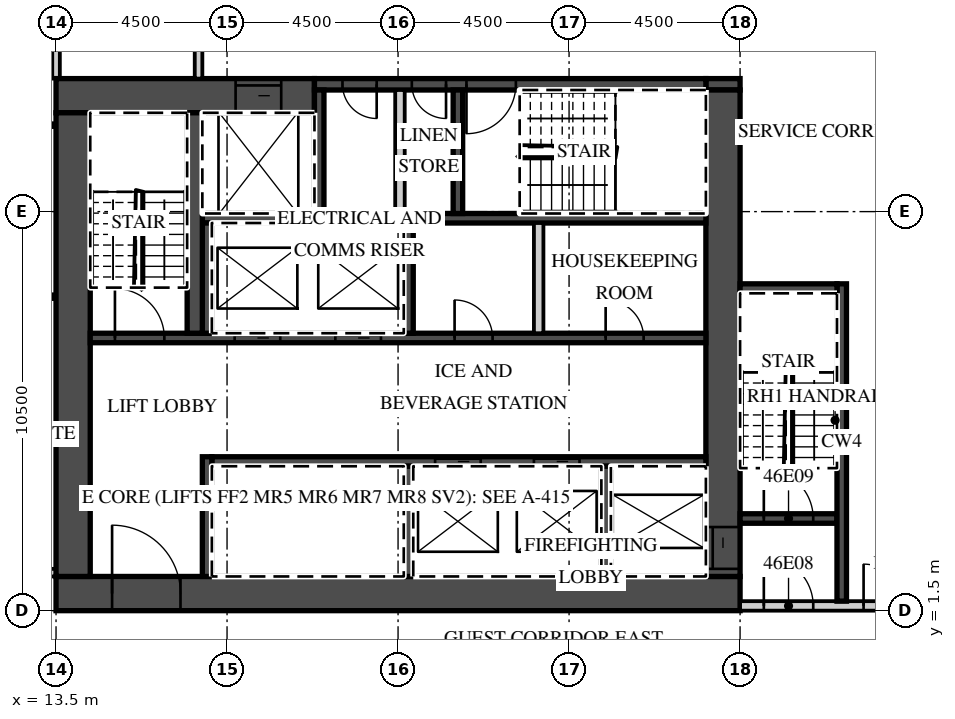
"""IFC4 building model, lengths in metres.
Left out: names, types, materials, properties, quantities, classifications, styles, units other than length and angle.
Written with IfcOpenShell. Run it as: python <this file> out.ifc"""

import sys

from ifc_helpers import new_model, si_unit, direction, frame, frame_2d, origin, place, context, subcontext, project, spatial, rectangle, extrude, element, fill, save


model = new_model("IFC4")
c1 = context("Model", 3, precision=1e-05, world=origin(), true_north=direction((0.0, 1.0)))
c2 = subcontext(c1, "Body", "Model", "MODEL_VIEW")
j1 = project(units=[si_unit("LENGTHUNIT", "METRE"), si_unit("PLANEANGLEUNIT", "RADIAN")], contexts=[c1])
p1 = place(None, origin())
s1 = spatial("IfcSite", under=j1, at=p1, CompositionType="ELEMENT")
p2 = place(p1, origin())
s2 = spatial("IfcBuilding", under=s1, at=p2, CompositionType="ELEMENT")
p3 = place(p2, frame((0.0, 0.0, 193.3)))
s3 = spatial("IfcBuildingStorey", under=s2, at=p3, CompositionType="ELEMENT", Elevation=193.3)
p4 = place(p3, frame((13.5, 15.5, 0.0), z_axis=(0.0, 0.0, 1.0), x_axis=(0.0, 1.0, 0.0)))
e1 = element("IfcWall", 1, at=p4, inside=s3, PredefinedType="PARTITIONING", context=c2, shape_type="SweptSolid", body=[
    extrude(rectangle(XDim=6.089, YDim=0.2, at=frame_2d((3.044, 0.0))), origin(), (0.0, 0.0, 1.0), 3.02),
])
p5 = place(p3, frame((-13.5, 2.5, 0.0), z_axis=(0.0, 0.0, 1.0), x_axis=(1.0, 0.0, 0.0)))
e2 = element("IfcWall", 2, at=p5, inside=s3, PredefinedType="PARTITIONING", context=c2, shape_type="SweptSolid", body=[
    extrude(rectangle(XDim=27.0, YDim=0.2, at=frame_2d((13.5, 0.0))), origin(), (0.0, 0.0, 1.0), 3.02),
])
p6 = place(p5, frame((0.575, 0.0, 0.0)))
e3 = element("IfcOpeningElement", 3, at=p6, cuts=e2, PredefinedType="OPENING", context=c2, shape_type="SweptSolid", body=[
    extrude(rectangle(XDim=1.0, YDim=2.1, at=frame_2d((0.5, 1.05))), frame((0.0, 0.11, 0.0), z_axis=(0.0, -1.0, 0.0), x_axis=(1.0, 0.0, 0.0)), (0.0, 0.0, 1.0), 0.22),
])
p7 = place(p5, frame((9.863, 0.0, 0.0)))
e4 = element("IfcOpeningElement", 4, at=p7, cuts=e2, PredefinedType="OPENING", context=c2, shape_type="SweptSolid", body=[
    extrude(rectangle(XDim=1.2, YDim=2.1, at=frame_2d((0.6, 1.05))), frame((0.0, 0.11, 0.0), z_axis=(0.0, -1.0, 0.0), x_axis=(1.0, 0.0, 0.0)), (0.0, 0.0, 1.0), 0.22),
])
p8 = place(p5, frame((14.075, 0.0, 0.0)))
e5 = element("IfcOpeningElement", 5, at=p8, cuts=e2, PredefinedType="OPENING", context=c2, shape_type="SweptSolid", body=[
    extrude(rectangle(XDim=1.0, YDim=2.1, at=frame_2d((0.5, 1.05))), frame((0.0, 0.11, 0.0), z_axis=(0.0, -1.0, 0.0), x_axis=(1.0, 0.0, 0.0)), (0.0, 0.0, 1.0), 0.22),
])
p9 = place(p5, frame((18.55, 0.0, 0.0)))
e6 = element("IfcOpeningElement", 6, at=p9, cuts=e2, PredefinedType="OPENING", context=c2, shape_type="SweptSolid", body=[
    extrude(rectangle(XDim=1.0, YDim=2.1, at=frame_2d((0.5, 1.05))), frame((0.0, 0.11, 0.0), z_axis=(0.0, -1.0, 0.0), x_axis=(1.0, 0.0, 0.0)), (0.0, 0.0, 1.0), 0.22),
])
p10 = place(p5, frame((23.075, 0.0, 0.0)))
e7 = element("IfcOpeningElement", 7, at=p10, cuts=e2, PredefinedType="OPENING", context=c2, shape_type="SweptSolid", body=[
    extrude(rectangle(XDim=1.0, YDim=2.1, at=frame_2d((0.5, 1.05))), frame((0.0, 0.11, 0.0), z_axis=(0.0, -1.0, 0.0), x_axis=(1.0, 0.0, 0.0)), (0.0, 0.0, 1.0), 0.22),
])
p11 = place(p3, frame((13.5, 1.95, 0.0), z_axis=(0.0, 0.0, 1.0), x_axis=(1.0, 0.0, 0.0)))
e8 = element("IfcWall", 8, at=p11, inside=s3, PredefinedType="SHEAR", context=c2, shape_type="SweptSolid", body=[
    extrude(rectangle(XDim=18.0, YDim=0.9, at=frame_2d((9.0, 0.0))), origin(), (0.0, 0.0, 1.0), 3.02),
])
p12 = place(p11, frame((1.475, 0.0, 0.0)))
e9 = element("IfcOpeningElement", 9, at=p12, cuts=e8, PredefinedType="OPENING", context=c2, shape_type="SweptSolid", body=[
    extrude(rectangle(XDim=1.8, YDim=2.1, at=frame_2d((0.9, 1.05))), frame((0.0, 0.46, 0.0), z_axis=(0.0, -1.0, 0.0), x_axis=(1.0, 0.0, 0.0)), (0.0, 0.0, 1.0), 0.92),
])
p13 = place(p3, frame((13.5, 15.05, 0.0), z_axis=(0.0, 0.0, 1.0), x_axis=(1.0, 0.0, 0.0)))
e10 = element("IfcWall", 10, at=p13, inside=s3, PredefinedType="SHEAR", context=c2, shape_type="SweptSolid", body=[
    extrude(rectangle(XDim=6.8, YDim=0.9, at=frame_2d((3.4, 0.0))), origin(), (0.0, 0.0, 1.0), 3.02),
])
p14 = place(p13, frame((4.725, 0.0, 0.0)))
e11 = element("IfcOpeningElement", 11, at=p14, cuts=e10, PredefinedType="OPENING", context=c2, shape_type="SweptSolid", body=[
    extrude(rectangle(XDim=1.2, YDim=2.1, at=frame_2d((0.6, 1.05))), frame((0.0, 0.46, 0.0), z_axis=(0.0, -1.0, 0.0), x_axis=(1.0, 0.0, 0.0)), (0.0, 0.0, 1.0), 0.92),
])
p15 = place(p3, frame((30.6, 15.35, 0.0), z_axis=(0.0, 0.0, 1.0), x_axis=(1.0, 0.0, 0.0)))
e12 = element("IfcWall", 12, at=p15, inside=s3, PredefinedType="SHEAR", context=c2, shape_type="SweptSolid", body=[
    extrude(rectangle(XDim=0.9, YDim=0.3, at=frame_2d((0.45, 0.0))), origin(), (0.0, 0.0, 1.0), 3.02),
])
p16 = place(p3, frame((20.3, 15.35, 0.0), z_axis=(0.0, 0.0, 1.0), x_axis=(1.0, 0.0, 0.0)))
e13 = element("IfcWall", 13, at=p16, inside=s3, PredefinedType="SHEAR", context=c2, shape_type="SweptSolid", body=[
    extrude(rectangle(XDim=10.3, YDim=0.3, at=frame_2d((5.15, 0.0))), origin(), (0.0, 0.0, 1.0), 3.02),
])
p17 = place(p16, frame((4.0, 0.0, 0.0)))
e14 = element("IfcOpeningElement", 14, at=p17, cuts=e13, PredefinedType="OPENING", context=c2, shape_type="SweptSolid", body=[
    extrude(rectangle(XDim=1.3, YDim=2.1, at=frame_2d((0.65, 1.05))), frame((0.0, 0.16, 0.0), z_axis=(0.0, -1.0, 0.0), x_axis=(1.0, 0.0, 0.0)), (0.0, 0.0, 1.0), 0.32),
])
p18 = place(p16, frame((2.562, 0.0, 0.0)))
e15 = element("IfcOpeningElement", 15, at=p18, cuts=e13, PredefinedType="OPENING", context=c2, shape_type="SweptSolid", body=[
    extrude(rectangle(XDim=0.9, YDim=2.1, at=frame_2d((0.45, 1.05))), frame((0.0, 0.16, 0.0), z_axis=(0.0, -1.0, 0.0), x_axis=(1.0, 0.0, 0.0)), (0.0, 0.0, 1.0), 0.32),
])
p19 = place(p16, frame((0.738, 0.0, 0.0)))
e16 = element("IfcOpeningElement", 16, at=p19, cuts=e13, PredefinedType="OPENING", context=c2, shape_type="SweptSolid", body=[
    extrude(rectangle(XDim=0.9, YDim=2.1, at=frame_2d((0.45, 1.05))), frame((0.0, 0.16, 0.0), z_axis=(0.0, -1.0, 0.0), x_axis=(1.0, 0.0, 0.0)), (0.0, 0.0, 1.0), 0.32),
])
p20 = place(p3, frame((31.05, 2.4, 0.0), z_axis=(0.0, 0.0, 1.0), x_axis=(0.0, 1.0, 0.0)))
e17 = element("IfcWall", 17, at=p20, inside=s3, PredefinedType="SHEAR", context=c2, shape_type="SweptSolid", body=[
    extrude(rectangle(XDim=12.8, YDim=0.9, at=frame_2d((6.4, 0.0))), origin(), (0.0, 0.0, 1.0), 3.02),
])
p21 = place(p20, frame((0.2, 0.0, 0.0)))
e18 = element("IfcOpeningElement", 18, at=p21, cuts=e17, PredefinedType="OPENING", context=c2, shape_type="SweptSolid", body=[
    extrude(rectangle(XDim=1.1, YDim=2.1, at=frame_2d((0.55, 1.05))), frame((0.0, 0.46, 0.0), z_axis=(0.0, -1.0, 0.0), x_axis=(1.0, 0.0, 0.0)), (0.0, 0.0, 1.0), 0.92),
])
p22 = place(p3, frame((13.95, 2.4, 0.0), z_axis=(0.0, 0.0, 1.0), x_axis=(0.0, 1.0, 0.0)))
e19 = element("IfcWall", 19, at=p22, inside=s3, PredefinedType="SHEAR", context=c2, shape_type="SweptSolid", body=[
    extrude(rectangle(XDim=12.2, YDim=0.9, at=frame_2d((6.1, 0.0))), origin(), (0.0, 0.0, 1.0), 3.02),
])
p23 = place(p3, frame((17.6, 5.425, 0.0), z_axis=(0.0, 0.0, 1.0), x_axis=(1.0, 0.0, 0.0)))
e20 = element("IfcWall", 20, at=p23, inside=s3, PredefinedType="SHEAR", context=c2, shape_type="SweptSolid", body=[
    extrude(rectangle(XDim=13.0, YDim=0.25, at=frame_2d((6.5, 0.0))), origin(), (0.0, 0.0, 1.0), 3.02),
])
p24 = place(p23, frame((8.475, 0.0, 0.0)))
e21 = element("IfcOpeningElement", 21, at=p24, cuts=e20, PredefinedType="OPENING", context=c2, shape_type="SweptSolid", body=[
    extrude(rectangle(XDim=1.2, YDim=2.1, at=frame_2d((0.6, 1.05))), frame((0.0, 0.135, 0.0), z_axis=(0.0, -1.0, 0.0), x_axis=(1.0, 0.0, 0.0)), (0.0, 0.0, 1.0), 0.27),
])
p25 = place(p23, frame((5.875, 0.0, 0.0)))
e22 = element("IfcOpeningElement", 22, at=p25, cuts=e20, PredefinedType="OPENING", context=c2, shape_type="SweptSolid", body=[
    extrude(rectangle(XDim=1.2, YDim=2.1, at=frame_2d((0.6, 1.05))), frame((0.0, 0.135, 0.0), z_axis=(0.0, -1.0, 0.0), x_axis=(1.0, 0.0, 0.0)), (0.0, 0.0, 1.0), 0.27),
])
p26 = place(p3, frame((17.475, 2.4, 0.0), z_axis=(0.0, 0.0, 1.0), x_axis=(0.0, 1.0, 0.0)))
e23 = element("IfcWall", 23, at=p26, inside=s3, PredefinedType="SHEAR", context=c2, shape_type="SweptSolid", body=[
    extrude(rectangle(XDim=3.15, YDim=0.25, at=frame_2d((1.575, 0.0))), origin(), (0.0, 0.0, 1.0), 3.02),
])
for number, where, z_axis, x_axis in (
    (24, (27.975, 2.4, 0.0), (0.0, 0.0, 1.0), (0.0, 1.0, 0.0)),
    (25, (22.775, 2.4, 0.0), (0.0, 0.0, 1.0), (0.0, 1.0, 0.0)),
):
    element("IfcWall", number, at=place(p3, frame(where, z_axis=z_axis, x_axis=x_axis)), inside=s3, PredefinedType="SHEAR", context=c2, shape_type="SweptSolid", body=[
        extrude(rectangle(XDim=2.9, YDim=0.25, at=frame_2d((1.45, 0.0))), origin(), (0.0, 0.0, 1.0), 3.02),
    ])
p27 = place(p3, frame((14.4, 8.675, 0.0), z_axis=(0.0, 0.0, 1.0), x_axis=(1.0, 0.0, 0.0)))
e26 = element("IfcWall", 26, at=p27, inside=s3, PredefinedType="SHEAR", context=c2, shape_type="SweptSolid", body=[
    extrude(rectangle(XDim=16.2, YDim=0.25, at=frame_2d((8.1, 0.0))), origin(), (0.0, 0.0, 1.0), 3.02),
])
p28 = place(p27, frame((6.45, 0.0, 0.0)))
e27 = element("IfcOpeningElement", 27, at=p28, cuts=e26, PredefinedType="OPENING", context=c2, shape_type="SweptSolid", body=[
    extrude(rectangle(XDim=1.2, YDim=2.1, at=frame_2d((0.6, 1.05))), frame((0.0, 0.135, 0.0), z_axis=(0.0, -1.0, 0.0), x_axis=(1.0, 0.0, 0.0)), (0.0, 0.0, 1.0), 0.27),
])
p29 = place(p27, frame((3.8, 0.0, 0.0)))
e28 = element("IfcOpeningElement", 28, at=p29, cuts=e26, PredefinedType="OPENING", context=c2, shape_type="SweptSolid", body=[
    extrude(rectangle(XDim=1.2, YDim=2.1, at=frame_2d((0.6, 1.05))), frame((0.0, 0.135, 0.0), z_axis=(0.0, -1.0, 0.0), x_axis=(1.0, 0.0, 0.0)), (0.0, 0.0, 1.0), 0.27),
])
p30 = place(p27, frame((0.65, 0.0, 0.0)))
e29 = element("IfcOpeningElement", 29, at=p30, cuts=e26, PredefinedType="OPENING", context=c2, shape_type="SweptSolid", body=[
    extrude(rectangle(XDim=1.3, YDim=2.1, at=frame_2d((0.65, 1.05))), frame((0.0, 0.135, 0.0), z_axis=(0.0, -1.0, 0.0), x_axis=(1.0, 0.0, 0.0)), (0.0, 0.0, 1.0), 0.27),
])
p31 = place(p27, frame((13.562, 0.0, 0.0)))
e30 = element("IfcOpeningElement", 30, at=p31, cuts=e26, PredefinedType="OPENING", context=c2, shape_type="SweptSolid", body=[
    extrude(rectangle(XDim=1.0, YDim=2.1, at=frame_2d((0.5, 1.05))), frame((0.0, 0.135, 0.0), z_axis=(0.0, -1.0, 0.0), x_axis=(1.0, 0.0, 0.0)), (0.0, 0.0, 1.0), 0.27),
])
p32 = place(p27, frame((9.587, 0.0, 0.0)))
e31 = element("IfcOpeningElement", 31, at=p32, cuts=e26, PredefinedType="OPENING", context=c2, shape_type="SweptSolid", body=[
    extrude(rectangle(XDim=1.0, YDim=2.1, at=frame_2d((0.5, 1.05))), frame((0.0, 0.135, 0.0), z_axis=(0.0, -1.0, 0.0), x_axis=(1.0, 0.0, 0.0)), (0.0, 0.0, 1.0), 0.27),
])
p33 = place(p3, frame((17.35, 11.825, 0.0), z_axis=(0.0, 0.0, 1.0), x_axis=(1.0, 0.0, 0.0)))
e32 = element("IfcWall", 32, at=p33, inside=s3, PredefinedType="SHEAR", context=c2, shape_type="SweptSolid", body=[
    extrude(rectangle(XDim=13.25, YDim=0.25, at=frame_2d((6.625, 0.0))), origin(), (0.0, 0.0, 1.0), 3.02),
])
for number, where, z_axis, x_axis in (
    (33, (17.475, 8.8, 0.0), (0.0, 0.0, 1.0), (0.0, 1.0, 0.0)),
    (34, (22.775, 8.8, 0.0), (0.0, 0.0, 1.0), (0.0, 1.0, 0.0)),
):
    element("IfcWall", number, at=place(p3, frame(where, z_axis=z_axis, x_axis=x_axis)), inside=s3, PredefinedType="SHEAR", context=c2, shape_type="SweptSolid", body=[
        extrude(rectangle(XDim=2.9, YDim=0.25, at=frame_2d((1.45, 0.0))), origin(), (0.0, 0.0, 1.0), 3.02),
    ])
p34 = place(p3, frame((26.2, 8.8, 0.0), z_axis=(0.0, 0.0, 1.0), x_axis=(0.0, 1.0, 0.0)))
e35 = element("IfcWall", 35, at=p34, inside=s3, PredefinedType="PARTITIONING", context=c2, shape_type="SweptSolid", body=[
    extrude(rectangle(XDim=2.9, YDim=0.25, at=frame_2d((1.45, 0.0))), origin(), (0.0, 0.0, 1.0), 3.02),
])
p35 = place(p3, frame((17.15, 8.8, 0.0), z_axis=(0.0, 0.0, 1.0), x_axis=(0.0, 1.0, 0.0)))
e36 = element("IfcWall", 36, at=p35, inside=s3, PredefinedType="SHEAR", context=c2, shape_type="SweptSolid", body=[
    extrude(rectangle(XDim=5.8, YDim=0.4, at=frame_2d((2.9, 0.0))), origin(), (0.0, 0.0, 1.0), 3.02),
])
for number, where, z_axis, x_axis in (
    (37, (20.425, 11.95, 0.0), (0.0, 0.0, 1.0), (0.0, 1.0, 0.0)),
    (38, (24.075, 11.95, 0.0), (0.0, 0.0, 1.0), (0.0, 1.0, 0.0)),
):
    element("IfcWall", number, at=place(p3, frame(where, z_axis=z_axis, x_axis=x_axis)), inside=s3, PredefinedType="SHEAR", context=c2, shape_type="SweptSolid", body=[
        extrude(rectangle(XDim=3.25, YDim=0.25, at=frame_2d((1.625, 0.0))), origin(), (0.0, 0.0, 1.0), 3.02),
    ])
p36 = place(p3, frame((22.55, 11.95, 0.0), z_axis=(0.0, 0.0, 1.0), x_axis=(0.0, 1.0, 0.0)))
e39 = element("IfcWall", 39, at=p36, inside=s3, PredefinedType="PARTITIONING", context=c2, shape_type="SweptSolid", body=[
    extrude(rectangle(XDim=3.25, YDim=0.25, at=frame_2d((1.625, 0.0))), origin(), (0.0, 0.0, 1.0), 3.02),
])
p37 = place(p3, frame((31.5, 1.625, 0.0), z_axis=(0.0, 0.0, 1.0), x_axis=(1.0, 0.0, 0.0)))
e40 = element("IfcWall", 40, at=p37, inside=s3, PredefinedType="PARTITIONING", context=c2, shape_type="SweptSolid", body=[
    extrude(rectangle(XDim=8.035, YDim=0.25, at=frame_2d((4.018, 0.0))), origin(), (0.0, 0.0, 1.0), 3.02),
])
p38 = place(p37, frame((0.625, 0.0, 0.0)))
e41 = element("IfcOpeningElement", 41, at=p38, cuts=e40, PredefinedType="OPENING", context=c2, shape_type="SweptSolid", body=[
    extrude(rectangle(XDim=1.3, YDim=2.1, at=frame_2d((0.65, 1.05))), frame((0.0, 0.135, 0.0), z_axis=(0.0, -1.0, 0.0), x_axis=(1.0, 0.0, 0.0)), (0.0, 0.0, 1.0), 0.27),
])
p39 = place(p37, frame((3.25, 0.0, 0.0)))
e42 = element("IfcOpeningElement", 42, at=p39, cuts=e40, PredefinedType="OPENING", context=c2, shape_type="SweptSolid", body=[
    extrude(rectangle(XDim=1.1, YDim=2.1, at=frame_2d((0.55, 1.05))), frame((0.0, 0.135, 0.0), z_axis=(0.0, -1.0, 0.0), x_axis=(1.0, 0.0, 0.0)), (0.0, 0.0, 1.0), 0.27),
])
p40 = place(p3, frame((31.5, 3.925, 0.0), z_axis=(0.0, 0.0, 1.0), x_axis=(1.0, 0.0, 0.0)))
e43 = element("IfcWall", 43, at=p40, inside=s3, PredefinedType="SHEAR", context=c2, shape_type="SweptSolid", body=[
    extrude(rectangle(XDim=2.55, YDim=0.25, at=frame_2d((1.275, 0.0))), origin(), (0.0, 0.0, 1.0), 3.02),
])
p41 = place(p40, frame((0.625, 0.0, 0.0)))
e44 = element("IfcOpeningElement", 44, at=p41, cuts=e43, PredefinedType="OPENING", context=c2, shape_type="SweptSolid", body=[
    extrude(rectangle(XDim=1.3, YDim=2.1, at=frame_2d((0.65, 1.05))), frame((0.0, 0.135, 0.0), z_axis=(0.0, -1.0, 0.0), x_axis=(1.0, 0.0, 0.0)), (0.0, 0.0, 1.0), 0.27),
])
p42 = place(p3, frame((34.175, 1.75, 0.0), z_axis=(0.0, 0.0, 1.0), x_axis=(0.0, 1.0, 0.0)))
e45 = element("IfcWall", 45, at=p42, inside=s3, PredefinedType="SHEAR", context=c2, shape_type="SweptSolid", body=[
    extrude(rectangle(XDim=8.35, YDim=0.25, at=frame_2d((4.175, 0.0))), origin(), (0.0, 0.0, 1.0), 3.02),
])
p43 = place(p3, frame((31.5, 9.975, 0.0), z_axis=(0.0, 0.0, 1.0), x_axis=(1.0, 0.0, 0.0)))
e46 = element("IfcWall", 46, at=p43, inside=s3, PredefinedType="SHEAR", context=c2, shape_type="SweptSolid", body=[
    extrude(rectangle(XDim=2.55, YDim=0.25, at=frame_2d((1.275, 0.0))), origin(), (0.0, 0.0, 1.0), 3.02),
])
p44 = place(p3, frame((17.25, 15.5, 0.0), z_axis=(0.0, 0.0, 1.0), x_axis=(0.0, 1.0, 0.0)))
e47 = element("IfcWall", 47, at=p44, inside=s3, PredefinedType="PARTITIONING", context=c2, shape_type="SweptSolid", body=[
    extrude(rectangle(XDim=2.2, YDim=0.2, at=frame_2d((1.1, 0.0))), origin(), (0.0, 0.0, 1.0), 3.02),
])
p45 = place(p28, origin())
e48 = element("IfcDoor", 48, at=p45, inside=s3, OperationType="SLIDING_TO_LEFT", PredefinedType="DOOR", context=c2, shape_type="SweptSolid", body=[
    extrude(rectangle(XDim=1.2, YDim=2.1, at=frame_2d((0.6, 1.05))), frame((0.0, 0.025, 0.0), z_axis=(0.0, -1.0, 0.0), x_axis=(1.0, 0.0, 0.0)), (0.0, 0.0, 1.0), 0.05),
])
fill(e27, e48)
p46 = place(p29, origin())
e49 = element("IfcDoor", 49, at=p46, inside=s3, OperationType="SLIDING_TO_RIGHT", PredefinedType="DOOR", context=c2, shape_type="SweptSolid", body=[
    extrude(rectangle(XDim=1.2, YDim=2.1, at=frame_2d((0.6, 1.05))), frame((0.0, 0.025, 0.0), z_axis=(0.0, -1.0, 0.0), x_axis=(1.0, 0.0, 0.0)), (0.0, 0.0, 1.0), 0.05),
])
fill(e28, e49)
p47 = place(p24, origin())
e50 = element("IfcDoor", 50, at=p47, inside=s3, OperationType="SLIDING_TO_LEFT", PredefinedType="DOOR", context=c2, shape_type="SweptSolid", body=[
    extrude(rectangle(XDim=1.2, YDim=2.1, at=frame_2d((0.6, 1.05))), frame((0.0, 0.025, 0.0), z_axis=(0.0, -1.0, 0.0), x_axis=(1.0, 0.0, 0.0)), (0.0, 0.0, 1.0), 0.05),
])
fill(e21, e50)
p48 = place(p25, origin())
e51 = element("IfcDoor", 51, at=p48, inside=s3, OperationType="SLIDING_TO_RIGHT", PredefinedType="DOOR", context=c2, shape_type="SweptSolid", body=[
    extrude(rectangle(XDim=1.2, YDim=2.1, at=frame_2d((0.6, 1.05))), frame((0.0, 0.025, 0.0), z_axis=(0.0, -1.0, 0.0), x_axis=(1.0, 0.0, 0.0)), (0.0, 0.0, 1.0), 0.05),
])
fill(e22, e51)
p49 = place(p14, origin())
e52 = element("IfcDoor", 52, at=p49, inside=s3, OperationType="SLIDING_TO_LEFT", PredefinedType="DOOR", context=c2, shape_type="SweptSolid", body=[
    extrude(rectangle(XDim=1.2, YDim=2.1, at=frame_2d((0.6, 1.05))), frame((0.0, 0.025, 0.0), z_axis=(0.0, -1.0, 0.0), x_axis=(1.0, 0.0, 0.0)), (0.0, 0.0, 1.0), 0.05),
])
fill(e11, e52)
p50 = place(p21, origin())
e53 = element("IfcDoor", 53, at=p50, inside=s3, OperationType="SLIDING_TO_LEFT", PredefinedType="DOOR", context=c2, shape_type="SweptSolid", body=[
    extrude(rectangle(XDim=1.1, YDim=2.1, at=frame_2d((0.55, 1.05))), frame((0.0, 0.025, 0.0), z_axis=(0.0, -1.0, 0.0), x_axis=(1.0, 0.0, 0.0)), (0.0, 0.0, 1.0), 0.05),
])
fill(e18, e53)
p51 = place(p12, origin())
e54 = element("IfcDoor", 54, at=p51, inside=s3, OperationType="DOUBLE_DOOR_DOUBLE_SWING", PredefinedType="DOOR", context=c2, shape_type="SweptSolid", body=[
    extrude(rectangle(XDim=1.8, YDim=2.1, at=frame_2d((0.9, 1.05))), frame((0.0, 0.025, 0.0), z_axis=(0.0, -1.0, 0.0), x_axis=(1.0, 0.0, 0.0)), (0.0, 0.0, 1.0), 0.05),
])
fill(e9, e54)
p52 = place(p38, origin())
e55 = element("IfcDoor", 55, at=p52, inside=s3, OperationType="SINGLE_SWING_LEFT", PredefinedType="DOOR", context=c2, shape_type="SweptSolid", body=[
    extrude(rectangle(XDim=1.3, YDim=2.1, at=frame_2d((0.65, 1.05))), frame((0.0, 0.025, 0.0), z_axis=(0.0, -1.0, 0.0), x_axis=(1.0, 0.0, 0.0)), (0.0, 0.0, 1.0), 0.05),
])
fill(e41, e55)
p53 = place(p41, origin())
e56 = element("IfcDoor", 56, at=p53, inside=s3, OperationType="SINGLE_SWING_LEFT", PredefinedType="DOOR", context=c2, shape_type="SweptSolid", body=[
    extrude(rectangle(XDim=1.3, YDim=2.1, at=frame_2d((0.65, 1.05))), frame((0.0, 0.025, 0.0), z_axis=(0.0, -1.0, 0.0), x_axis=(1.0, 0.0, 0.0)), (0.0, 0.0, 1.0), 0.05),
])
fill(e44, e56)
p54 = place(p39, origin())
e57 = element("IfcDoor", 57, at=p54, inside=s3, OperationType="SINGLE_SWING_LEFT", PredefinedType="DOOR", context=c2, shape_type="SweptSolid", body=[
    extrude(rectangle(XDim=1.1, YDim=2.1, at=frame_2d((0.55, 1.05))), frame((0.0, 0.025, 0.0), z_axis=(0.0, -1.0, 0.0), x_axis=(1.0, 0.0, 0.0)), (0.0, 0.0, 1.0), 0.05),
])
fill(e42, e57)
p55 = place(p30, origin())
e58 = element("IfcDoor", 58, at=p55, inside=s3, OperationType="SINGLE_SWING_LEFT", PredefinedType="DOOR", context=c2, shape_type="SweptSolid", body=[
    extrude(rectangle(XDim=1.3, YDim=2.1, at=frame_2d((0.65, 1.05))), frame((0.0, 0.025, 0.0), z_axis=(0.0, -1.0, 0.0), x_axis=(1.0, 0.0, 0.0)), (0.0, 0.0, 1.0), 0.05),
])
fill(e29, e58)
p56 = place(p17, origin())
e59 = element("IfcDoor", 59, at=p56, inside=s3, OperationType="SINGLE_SWING_LEFT", PredefinedType="DOOR", context=c2, shape_type="SweptSolid", body=[
    extrude(rectangle(XDim=1.3, YDim=2.1, at=frame_2d((0.65, 1.05))), frame((0.0, 0.025, 0.0), z_axis=(0.0, -1.0, 0.0), x_axis=(1.0, 0.0, 0.0)), (0.0, 0.0, 1.0), 0.05),
])
fill(e14, e59)
p57 = place(p18, origin())
e60 = element("IfcDoor", 60, at=p57, inside=s3, OperationType="SINGLE_SWING_RIGHT", PredefinedType="DOOR", context=c2, shape_type="SweptSolid", body=[
    extrude(rectangle(XDim=0.9, YDim=2.1, at=frame_2d((0.45, 1.05))), frame((0.0, 0.025, 0.0), z_axis=(0.0, -1.0, 0.0), x_axis=(1.0, 0.0, 0.0)), (0.0, 0.0, 1.0), 0.05),
])
fill(e15, e60)
p58 = place(p19, origin())
e61 = element("IfcDoor", 61, at=p58, inside=s3, OperationType="SINGLE_SWING_RIGHT", PredefinedType="DOOR", context=c2, shape_type="SweptSolid", body=[
    extrude(rectangle(XDim=0.9, YDim=2.1, at=frame_2d((0.45, 1.05))), frame((0.0, 0.025, 0.0), z_axis=(0.0, -1.0, 0.0), x_axis=(1.0, 0.0, 0.0)), (0.0, 0.0, 1.0), 0.05),
])
fill(e16, e61)
p59 = place(p31, origin())
e62 = element("IfcDoor", 62, at=p59, inside=s3, OperationType="SINGLE_SWING_LEFT", PredefinedType="DOOR", context=c2, shape_type="SweptSolid", body=[
    extrude(rectangle(XDim=1.0, YDim=2.1, at=frame_2d((0.5, 1.05))), frame((0.0, 0.025, 0.0), z_axis=(0.0, -1.0, 0.0), x_axis=(1.0, 0.0, 0.0)), (0.0, 0.0, 1.0), 0.05),
])
fill(e30, e62)
p60 = place(p32, origin())
e63 = element("IfcDoor", 63, at=p60, inside=s3, OperationType="SINGLE_SWING_LEFT", PredefinedType="DOOR", context=c2, shape_type="SweptSolid", body=[
    extrude(rectangle(XDim=1.0, YDim=2.1, at=frame_2d((0.5, 1.05))), frame((0.0, 0.025, 0.0), z_axis=(0.0, -1.0, 0.0), x_axis=(1.0, 0.0, 0.0)), (0.0, 0.0, 1.0), 0.05),
])
fill(e31, e63)
save(model, sys.argv[1])
